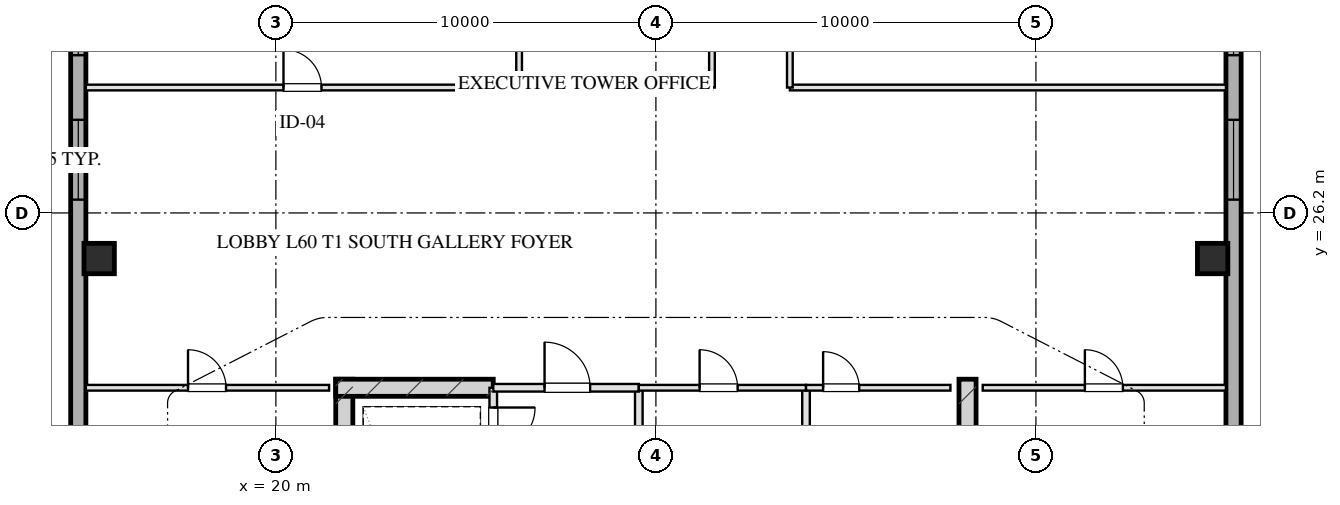
"""IFC4 building model, lengths in metres.
Left out: names, types, materials, properties, quantities, classifications, styles, units other than length and angle.
Written with IfcOpenShell. Run it as: python <this file> out.ifc"""

import sys

from ifc_helpers import new_model, si_unit, direction, frame, frame_2d, origin, origin_2d, place, context, subcontext, project, spatial, rectangle, hollow_rectangle, extrude, element, fill, save


model = new_model("IFC4")
c1 = context("Model", 3, precision=1e-05, world=origin(), true_north=direction((0.0, 1.0)))
c2 = subcontext(c1, "Body", "Model", "MODEL_VIEW")
j1 = project(units=[si_unit("LENGTHUNIT", "METRE"), si_unit("PLANEANGLEUNIT", "RADIAN")], contexts=[c1])
p1 = place(None, origin())
s1 = spatial("IfcSite", under=j1, at=p1, CompositionType="ELEMENT")
p2 = place(p1, origin())
s2 = spatial("IfcBuilding", under=s1, at=p2, CompositionType="ELEMENT")
p3 = place(p2, frame((0.0, 0.0, 223.1)))
s3 = spatial("IfcBuildingStorey", under=s2, at=p3, CompositionType="ELEMENT", Elevation=223.1)
for number, where, z_axis, x_axis in (
    (1, (21.8, 21.825, 0.0), (0.0, 0.0, 1.0), (0.0, -1.0, 0.0)),
    (2, (38.2, 21.825, 0.0), (0.0, 0.0, 1.0), (0.0, -1.0, 0.0)),
):
    element("IfcWall", number, at=place(p3, frame(where, z_axis=z_axis, x_axis=x_axis)), inside=s3, PredefinedType="SHEAR", context=c2, shape_type="SweptSolid", body=[
        extrude(rectangle(XDim=9.33, YDim=0.45, at=frame_2d((4.665, 0.0))), origin(), (0.0, 0.0, 1.0), 3.45),
    ])
p4 = place(p3, frame((21.575, 21.6, 0.0), z_axis=(0.0, 0.0, 1.0), x_axis=(1.0, 0.0, 0.0)))
e3 = element("IfcWall", 3, at=p4, inside=s3, PredefinedType="SHEAR", context=c2, shape_type="SweptSolid", body=[
    extrude(rectangle(XDim=4.145, YDim=0.45, at=frame_2d((2.073, 0.0))), origin(), (0.0, 0.0, 1.0), 3.45),
])
for number, where, z_axis, x_axis in (
    (4, (15.35, 25.0, 0.0), (0.0, 0.0, 1.0), (1.0, 0.0, 0.0)),
    (5, (44.65, 25.0, 0.0), (0.0, 0.0, 1.0), (1.0, 0.0, 0.0)),
):
    element("IfcColumn", number, at=place(p3, frame(where, z_axis=z_axis, x_axis=x_axis)), inside=s3, PredefinedType="COLUMN", context=c2, shape_type="SweptSolid", body=[
        extrude(hollow_rectangle(XDim=0.8, YDim=0.8, WallThickness=0.028, at=origin_2d()), origin(), (0.0, 0.0, 1.0), 3.451),
    ])
p5 = place(p3, frame((14.8, 13.1, 0.0), z_axis=(0.0, 0.0, 1.0), x_axis=(0.0, 1.0, 0.0)))
e6 = element("IfcWall", 6, at=p5, inside=s3, PredefinedType="SOLIDWALL", context=c2, shape_type="SweptSolid", body=[
    extrude(rectangle(XDim=41.8, YDim=0.4, at=frame_2d((20.9, 0.0))), origin(), (0.0, 0.0, 1.0), 2.61),
])
p6 = place(p5, frame((13.45, 0.0, 0.75)))
e7 = element("IfcOpeningElement", 7, at=p6, cuts=e6, PredefinedType="OPENING", context=c2, shape_type="SweptSolid", body=[
    extrude(rectangle(XDim=2.1, YDim=1.46, at=frame_2d((1.05, 0.73))), frame((0.0, 0.21, 0.0), z_axis=(0.0, -1.0, 0.0), x_axis=(1.0, 0.0, 0.0)), (0.0, 0.0, 1.0), 0.42),
])
p7 = place(p5, frame((17.25, 0.0, 0.75)))
e8 = element("IfcOpeningElement", 8, at=p7, cuts=e6, PredefinedType="OPENING", context=c2, shape_type="SweptSolid", body=[
    extrude(rectangle(XDim=2.1, YDim=1.46, at=frame_2d((1.05, 0.73))), frame((0.0, 0.21, 0.0), z_axis=(0.0, -1.0, 0.0), x_axis=(1.0, 0.0, 0.0)), (0.0, 0.0, 1.0), 0.42),
])
p8 = place(p5, frame((22.45, 0.0, 0.75)))
e9 = element("IfcOpeningElement", 9, at=p8, cuts=e6, PredefinedType="OPENING", context=c2, shape_type="SweptSolid", body=[
    extrude(rectangle(XDim=2.1, YDim=1.46, at=frame_2d((1.05, 0.73))), frame((0.0, 0.21, 0.0), z_axis=(0.0, -1.0, 0.0), x_axis=(1.0, 0.0, 0.0)), (0.0, 0.0, 1.0), 0.42),
])
p9 = place(p5, frame((26.25, 0.0, 0.75)))
e10 = element("IfcOpeningElement", 10, at=p9, cuts=e6, PredefinedType="OPENING", context=c2, shape_type="SweptSolid", body=[
    extrude(rectangle(XDim=2.1, YDim=1.46, at=frame_2d((1.05, 0.73))), frame((0.0, 0.21, 0.0), z_axis=(0.0, -1.0, 0.0), x_axis=(1.0, 0.0, 0.0)), (0.0, 0.0, 1.0), 0.42),
])
p10 = place(p3, frame((45.2, 54.9, 0.0), z_axis=(0.0, 0.0, 1.0), x_axis=(0.0, -1.0, 0.0)))
e11 = element("IfcWall", 11, at=p10, inside=s3, PredefinedType="SOLIDWALL", context=c2, shape_type="SweptSolid", body=[
    extrude(rectangle(XDim=41.8, YDim=0.4, at=frame_2d((20.9, 0.0))), origin(), (0.0, 0.0, 1.0), 2.61),
])
p11 = place(p10, frame((26.25, 0.0, 0.75)))
e12 = element("IfcOpeningElement", 12, at=p11, cuts=e11, PredefinedType="OPENING", context=c2, shape_type="SweptSolid", body=[
    extrude(rectangle(XDim=2.1, YDim=1.46, at=frame_2d((1.05, 0.73))), frame((0.0, 0.21, 0.0), z_axis=(0.0, -1.0, 0.0), x_axis=(1.0, 0.0, 0.0)), (0.0, 0.0, 1.0), 0.42),
])
p12 = place(p10, frame((22.45, 0.0, 0.75)))
e13 = element("IfcOpeningElement", 13, at=p12, cuts=e11, PredefinedType="OPENING", context=c2, shape_type="SweptSolid", body=[
    extrude(rectangle(XDim=2.1, YDim=1.46, at=frame_2d((1.05, 0.73))), frame((0.0, 0.21, 0.0), z_axis=(0.0, -1.0, 0.0), x_axis=(1.0, 0.0, 0.0)), (0.0, 0.0, 1.0), 0.42),
])
p13 = place(p10, frame((17.25, 0.0, 0.75)))
e14 = element("IfcOpeningElement", 14, at=p13, cuts=e11, PredefinedType="OPENING", context=c2, shape_type="SweptSolid", body=[
    extrude(rectangle(XDim=2.1, YDim=1.46, at=frame_2d((1.05, 0.73))), frame((0.0, 0.21, 0.0), z_axis=(0.0, -1.0, 0.0), x_axis=(1.0, 0.0, 0.0)), (0.0, 0.0, 1.0), 0.42),
])
p14 = place(p10, frame((13.45, 0.0, 0.75)))
e15 = element("IfcOpeningElement", 15, at=p14, cuts=e11, PredefinedType="OPENING", context=c2, shape_type="SweptSolid", body=[
    extrude(rectangle(XDim=2.1, YDim=1.46, at=frame_2d((1.05, 0.73))), frame((0.0, 0.21, 0.0), z_axis=(0.0, -1.0, 0.0), x_axis=(1.0, 0.0, 0.0)), (0.0, 0.0, 1.0), 0.42),
])
p15 = place(p3, frame((25.72, 21.6, 0.0), z_axis=(0.0, 0.0, 1.0), x_axis=(0.0, -1.0, 0.0)))
e16 = element("IfcWall", 16, at=p15, inside=s3, PredefinedType="PARTITIONING", context=c2, shape_type="SweptSolid", body=[
    extrude(rectangle(XDim=1.9, YDim=0.2, at=frame_2d((0.95, 0.0))), origin(), (0.0, 0.0, 1.0), 3.175),
])
p16 = place(p15, frame((0.52, 0.0, 0.0)))
e17 = element("IfcOpeningElement", 17, at=p16, cuts=e16, PredefinedType="OPENING", context=c2, shape_type="SweptSolid", body=[
    extrude(rectangle(XDim=1.1, YDim=2.05, at=frame_2d((0.55, 1.025))), frame((0.0, 0.11, 0.0), z_axis=(0.0, -1.0, 0.0), x_axis=(1.0, 0.0, 0.0)), (0.0, 0.0, 1.0), 0.22),
])
p17 = place(p3, frame((29.55, 21.6, 0.0), z_axis=(0.0, 0.0, 1.0), x_axis=(0.0, -1.0, 0.0)))
e18 = element("IfcWall", 18, at=p17, inside=s3, PredefinedType="PARTITIONING", context=c2, shape_type="SweptSolid", body=[
    extrude(rectangle(XDim=8.43, YDim=0.2, at=frame_2d((4.215, 0.0))), origin(), (0.0, 0.0, 1.0), 3.175),
])
p18 = place(p3, frame((25.72, 21.6, 0.0), z_axis=(0.0, 0.0, 1.0), x_axis=(1.0, 0.0, 0.0)))
e19 = element("IfcWall", 19, at=p18, inside=s3, PredefinedType="PARTITIONING", context=c2, shape_type="SweptSolid", body=[
    extrude(rectangle(XDim=3.83, YDim=0.2, at=frame_2d((1.915, 0.0))), origin(), (0.0, 0.0, 1.0), 3.175),
])
p19 = place(p18, frame((1.35, 0.0, 0.0)))
e20 = element("IfcOpeningElement", 20, at=p19, cuts=e19, PredefinedType="OPENING", context=c2, shape_type="SweptSolid", body=[
    extrude(rectangle(XDim=1.2, YDim=2.05, at=frame_2d((0.6, 1.025))), frame((0.0, 0.11, 0.0), z_axis=(0.0, -1.0, 0.0), x_axis=(1.0, 0.0, 0.0)), (0.0, 0.0, 1.0), 0.22),
])
p20 = place(p3, frame((33.95, 21.6, 0.0), z_axis=(0.0, 0.0, 1.0), x_axis=(0.0, -1.0, 0.0)))
e21 = element("IfcWall", 21, at=p20, inside=s3, PredefinedType="PARTITIONING", context=c2, shape_type="SweptSolid", body=[
    extrude(rectangle(XDim=8.43, YDim=0.2, at=frame_2d((4.215, 0.0))), origin(), (0.0, 0.0, 1.0), 3.175),
])
p21 = place(p3, frame((29.55, 21.6, 0.0), z_axis=(0.0, 0.0, 1.0), x_axis=(1.0, 0.0, 0.0)))
e22 = element("IfcWall", 22, at=p21, inside=s3, PredefinedType="PARTITIONING", context=c2, shape_type="SweptSolid", body=[
    extrude(rectangle(XDim=4.4, YDim=0.15, at=frame_2d((2.2, 0.0))), origin(), (0.0, 0.0, 1.0), 3.175),
])
p22 = place(p21, frame((1.6, 0.0, 0.0)))
e23 = element("IfcOpeningElement", 23, at=p22, cuts=e22, PredefinedType="OPENING", context=c2, shape_type="SweptSolid", body=[
    extrude(rectangle(XDim=1.0, YDim=2.05, at=frame_2d((0.5, 1.025))), frame((0.0, 0.085, 0.0), z_axis=(0.0, -1.0, 0.0), x_axis=(1.0, 0.0, 0.0)), (0.0, 0.0, 1.0), 0.17),
])
p23 = place(p3, frame((33.95, 21.6, 0.0), z_axis=(0.0, 0.0, 1.0), x_axis=(1.0, 0.0, 0.0)))
e24 = element("IfcWall", 24, at=p23, inside=s3, PredefinedType="PARTITIONING", context=c2, shape_type="SweptSolid", body=[
    extrude(rectangle(XDim=3.8, YDim=0.15, at=frame_2d((1.9, 0.0))), origin(), (0.0, 0.0, 1.0), 3.175),
])
p24 = place(p23, frame((0.45, 0.0, 0.0)))
e25 = element("IfcOpeningElement", 25, at=p24, cuts=e24, PredefinedType="OPENING", context=c2, shape_type="SweptSolid", body=[
    extrude(rectangle(XDim=0.95, YDim=2.05, at=frame_2d((0.475, 1.025))), frame((0.0, 0.085, 0.0), z_axis=(0.0, -1.0, 0.0), x_axis=(1.0, 0.0, 0.0)), (0.0, 0.0, 1.0), 0.17),
])
p25 = place(p3, frame((15.0, 21.6, 0.0), z_axis=(0.0, 0.0, 1.0), x_axis=(1.0, 0.0, 0.0)))
e26 = element("IfcWall", 26, at=p25, inside=s3, PredefinedType="PARTITIONING", context=c2, shape_type="SweptSolid", body=[
    extrude(rectangle(XDim=6.4, YDim=0.15, at=frame_2d((3.2, 0.0))), origin(), (0.0, 0.0, 1.0), 3.175),
])
p26 = place(p25, frame((2.688, 0.0, 0.0)))
e27 = element("IfcOpeningElement", 27, at=p26, cuts=e26, PredefinedType="OPENING", context=c2, shape_type="SweptSolid", body=[
    extrude(rectangle(XDim=1.0, YDim=2.05, at=frame_2d((0.5, 1.025))), frame((0.0, 0.085, 0.0), z_axis=(0.0, -1.0, 0.0), x_axis=(1.0, 0.0, 0.0)), (0.0, 0.0, 1.0), 0.17),
])
p27 = place(p3, frame((38.6, 21.6, 0.0), z_axis=(0.0, 0.0, 1.0), x_axis=(1.0, 0.0, 0.0)))
e28 = element("IfcWall", 28, at=p27, inside=s3, PredefinedType="PARTITIONING", context=c2, shape_type="SweptSolid", body=[
    extrude(rectangle(XDim=6.4, YDim=0.15, at=frame_2d((3.2, 0.0))), origin(), (0.0, 0.0, 1.0), 3.175),
])
p28 = place(p27, frame((2.688, 0.0, 0.0)))
e29 = element("IfcOpeningElement", 29, at=p28, cuts=e28, PredefinedType="OPENING", context=c2, shape_type="SweptSolid", body=[
    extrude(rectangle(XDim=1.0, YDim=2.05, at=frame_2d((0.5, 1.025))), frame((0.0, 0.085, 0.0), z_axis=(0.0, -1.0, 0.0), x_axis=(1.0, 0.0, 0.0)), (0.0, 0.0, 1.0), 0.17),
])
p29 = place(p3, frame((15.0, 29.5, 0.0), z_axis=(0.0, 0.0, 1.0), x_axis=(1.0, 0.0, 0.0)))
e30 = element("IfcWall", 30, at=p29, inside=s3, PredefinedType="PARTITIONING", context=c2, shape_type="SweptSolid", body=[
    extrude(rectangle(XDim=16.475, YDim=0.15, at=frame_2d((8.238, 0.0))), origin(), (0.0, 0.0, 1.0), 3.175),
])
p30 = place(p29, frame((5.2, 0.0, 0.0)))
e31 = element("IfcOpeningElement", 31, at=p30, cuts=e30, PredefinedType="OPENING", context=c2, shape_type="SweptSolid", body=[
    extrude(rectangle(XDim=1.0, YDim=2.05, at=frame_2d((0.5, 1.025))), frame((0.0, 0.085, 0.0), z_axis=(0.0, -1.0, 0.0), x_axis=(1.0, 0.0, 0.0)), (0.0, 0.0, 1.0), 0.17),
])
p31 = place(p3, frame((33.525, 29.5, 0.0), z_axis=(0.0, 0.0, 1.0), x_axis=(1.0, 0.0, 0.0)))
e32 = element("IfcWall", 32, at=p31, inside=s3, PredefinedType="PARTITIONING", context=c2, shape_type="SweptSolid", body=[
    extrude(rectangle(XDim=11.475, YDim=0.15, at=frame_2d((5.738, 0.0))), origin(), (0.0, 0.0, 1.0), 3.175),
])
p32 = place(p3, frame((31.475, 29.5, 0.0), z_axis=(0.0, 0.0, 1.0), x_axis=(0.0, 1.0, 0.0)))
e33 = element("IfcWall", 33, at=p32, inside=s3, PredefinedType="PARTITIONING", context=c2, shape_type="SweptSolid", body=[
    extrude(rectangle(XDim=9.0, YDim=0.15, at=frame_2d((4.5, 0.0))), origin(), (0.0, 0.0, 1.0), 3.175),
])
p33 = place(p32, frame((1.165, 0.0, 0.0)))
e34 = element("IfcOpeningElement", 34, at=p33, cuts=e33, PredefinedType="OPENING", context=c2, shape_type="SweptSolid", body=[
    extrude(rectangle(XDim=1.05, YDim=2.05, at=frame_2d((0.525, 1.025))), frame((0.0, 0.085, 0.0), z_axis=(0.0, -1.0, 0.0), x_axis=(1.0, 0.0, 0.0)), (0.0, 0.0, 1.0), 0.17),
])
p34 = place(p32, frame((4.0, 0.0, 0.0)))
e35 = element("IfcOpeningElement", 35, at=p34, cuts=e33, PredefinedType="OPENING", context=c2, shape_type="SweptSolid", body=[
    extrude(rectangle(XDim=1.0, YDim=2.05, at=frame_2d((0.5, 1.025))), frame((0.0, 0.085, 0.0), z_axis=(0.0, -1.0, 0.0), x_axis=(1.0, 0.0, 0.0)), (0.0, 0.0, 1.0), 0.17),
])
p35 = place(p32, frame((6.835, 0.0, 0.0)))
e36 = element("IfcOpeningElement", 36, at=p35, cuts=e33, PredefinedType="OPENING", context=c2, shape_type="SweptSolid", body=[
    extrude(rectangle(XDim=1.0, YDim=2.05, at=frame_2d((0.5, 1.025))), frame((0.0, 0.085, 0.0), z_axis=(0.0, -1.0, 0.0), x_axis=(1.0, 0.0, 0.0)), (0.0, 0.0, 1.0), 0.17),
])
p36 = place(p3, frame((33.525, 29.5, 0.0), z_axis=(0.0, 0.0, 1.0), x_axis=(0.0, 1.0, 0.0)))
e37 = element("IfcWall", 37, at=p36, inside=s3, PredefinedType="PARTITIONING", context=c2, shape_type="SweptSolid", body=[
    extrude(rectangle(XDim=9.0, YDim=0.15, at=frame_2d((4.5, 0.0))), origin(), (0.0, 0.0, 1.0), 3.175),
])
p37 = place(p36, frame((2.335, 0.0, 0.0)))
e38 = element("IfcOpeningElement", 38, at=p37, cuts=e37, PredefinedType="OPENING", context=c2, shape_type="SweptSolid", body=[
    extrude(rectangle(XDim=1.0, YDim=2.05, at=frame_2d((0.5, 1.025))), frame((0.0, 0.085, 0.0), z_axis=(0.0, -1.0, 0.0), x_axis=(1.0, 0.0, 0.0)), (0.0, 0.0, 1.0), 0.17),
])
p38 = place(p36, frame((6.835, 0.0, 0.0)))
e39 = element("IfcOpeningElement", 39, at=p38, cuts=e37, PredefinedType="OPENING", context=c2, shape_type="SweptSolid", body=[
    extrude(rectangle(XDim=1.0, YDim=2.05, at=frame_2d((0.5, 1.025))), frame((0.0, 0.085, 0.0), z_axis=(0.0, -1.0, 0.0), x_axis=(1.0, 0.0, 0.0)), (0.0, 0.0, 1.0), 0.17),
])
p39 = place(p3, frame((26.4, 29.5, 0.0), z_axis=(0.0, 0.0, 1.0), x_axis=(0.0, 1.0, 0.0)))
e40 = element("IfcWall", 40, at=p39, inside=s3, PredefinedType="PARTITIONING", context=c2, shape_type="SweptSolid", body=[
    extrude(rectangle(XDim=3.33, YDim=0.15, at=frame_2d((1.665, 0.0))), origin(), (0.0, 0.0, 1.0), 3.175),
])
p40 = place(p6, origin())
e41 = element("IfcWindow", 41, at=p40, inside=s3, PartitioningType="TRIPLE_PANEL_VERTICAL", PredefinedType="WINDOW", context=c2, shape_type="SweptSolid", body=[
    extrude(rectangle(XDim=2.1, YDim=1.46, at=frame_2d((1.05, 0.73))), frame((0.0, 0.03, 0.0), z_axis=(0.0, -1.0, 0.0), x_axis=(1.0, 0.0, 0.0)), (0.0, 0.0, 1.0), 0.06),
])
fill(e7, e41)
p41 = place(p7, origin())
e42 = element("IfcWindow", 42, at=p41, inside=s3, PartitioningType="TRIPLE_PANEL_VERTICAL", PredefinedType="WINDOW", context=c2, shape_type="SweptSolid", body=[
    extrude(rectangle(XDim=2.1, YDim=1.46, at=frame_2d((1.05, 0.73))), frame((0.0, 0.03, 0.0), z_axis=(0.0, -1.0, 0.0), x_axis=(1.0, 0.0, 0.0)), (0.0, 0.0, 1.0), 0.06),
])
fill(e8, e42)
p42 = place(p11, origin())
e43 = element("IfcWindow", 43, at=p42, inside=s3, PartitioningType="TRIPLE_PANEL_VERTICAL", PredefinedType="WINDOW", context=c2, shape_type="SweptSolid", body=[
    extrude(rectangle(XDim=2.1, YDim=1.46, at=frame_2d((1.05, 0.73))), frame((0.0, 0.03, 0.0), z_axis=(0.0, -1.0, 0.0), x_axis=(1.0, 0.0, 0.0)), (0.0, 0.0, 1.0), 0.06),
])
fill(e12, e43)
p43 = place(p12, origin())
e44 = element("IfcWindow", 44, at=p43, inside=s3, PartitioningType="TRIPLE_PANEL_VERTICAL", PredefinedType="WINDOW", context=c2, shape_type="SweptSolid", body=[
    extrude(rectangle(XDim=2.1, YDim=1.46, at=frame_2d((1.05, 0.73))), frame((0.0, 0.03, 0.0), z_axis=(0.0, -1.0, 0.0), x_axis=(1.0, 0.0, 0.0)), (0.0, 0.0, 1.0), 0.06),
])
fill(e13, e44)
p44 = place(p16, origin())
e45 = element("IfcDoor", 45, at=p44, inside=s3, OperationType="SINGLE_SWING_LEFT", PredefinedType="DOOR", context=c2, shape_type="SweptSolid", body=[
    extrude(rectangle(XDim=1.1, YDim=2.05, at=frame_2d((0.55, 1.025))), frame((0.0, 0.025, 0.0), z_axis=(0.0, -1.0, 0.0), x_axis=(1.0, 0.0, 0.0)), (0.0, 0.0, 1.0), 0.05),
])
fill(e17, e45)
p45 = place(p19, origin())
e46 = element("IfcDoor", 46, at=p45, inside=s3, OperationType="SINGLE_SWING_LEFT", PredefinedType="DOOR", context=c2, shape_type="SweptSolid", body=[
    extrude(rectangle(XDim=1.2, YDim=2.05, at=frame_2d((0.6, 1.025))), frame((0.0, 0.025, 0.0), z_axis=(0.0, -1.0, 0.0), x_axis=(1.0, 0.0, 0.0)), (0.0, 0.0, 1.0), 0.05),
])
fill(e20, e46)
p46 = place(p22, origin())
e47 = element("IfcDoor", 47, at=p46, inside=s3, OperationType="SINGLE_SWING_LEFT", PredefinedType="DOOR", context=c2, shape_type="SweptSolid", body=[
    extrude(rectangle(XDim=1.0, YDim=2.05, at=frame_2d((0.5, 1.025))), frame((0.0, 0.025, 0.0), z_axis=(0.0, -1.0, 0.0), x_axis=(1.0, 0.0, 0.0)), (0.0, 0.0, 1.0), 0.05),
])
fill(e23, e47)
p47 = place(p24, origin())
e48 = element("IfcDoor", 48, at=p47, inside=s3, OperationType="SINGLE_SWING_LEFT", PredefinedType="DOOR", context=c2, shape_type="SweptSolid", body=[
    extrude(rectangle(XDim=0.95, YDim=2.05, at=frame_2d((0.475, 1.025))), frame((0.0, 0.025, 0.0), z_axis=(0.0, -1.0, 0.0), x_axis=(1.0, 0.0, 0.0)), (0.0, 0.0, 1.0), 0.05),
])
fill(e25, e48)
p48 = place(p26, origin())
e49 = element("IfcDoor", 49, at=p48, inside=s3, OperationType="SINGLE_SWING_LEFT", PredefinedType="DOOR", context=c2, shape_type="SweptSolid", body=[
    extrude(rectangle(XDim=1.0, YDim=2.05, at=frame_2d((0.5, 1.025))), frame((0.0, 0.025, 0.0), z_axis=(0.0, -1.0, 0.0), x_axis=(1.0, 0.0, 0.0)), (0.0, 0.0, 1.0), 0.05),
])
fill(e27, e49)
p49 = place(p28, origin())
e50 = element("IfcDoor", 50, at=p49, inside=s3, OperationType="SINGLE_SWING_LEFT", PredefinedType="DOOR", context=c2, shape_type="SweptSolid", body=[
    extrude(rectangle(XDim=1.0, YDim=2.05, at=frame_2d((0.5, 1.025))), frame((0.0, 0.025, 0.0), z_axis=(0.0, -1.0, 0.0), x_axis=(1.0, 0.0, 0.0)), (0.0, 0.0, 1.0), 0.05),
])
fill(e29, e50)
p50 = place(p30, origin())
e51 = element("IfcDoor", 51, at=p50, inside=s3, OperationType="SINGLE_SWING_LEFT", PredefinedType="DOOR", context=c2, shape_type="SweptSolid", body=[
    extrude(rectangle(XDim=1.0, YDim=2.05, at=frame_2d((0.5, 1.025))), frame((0.0, 0.025, 0.0), z_axis=(0.0, -1.0, 0.0), x_axis=(1.0, 0.0, 0.0)), (0.0, 0.0, 1.0), 0.05),
])
fill(e31, e51)
save(model, sys.argv[1])
